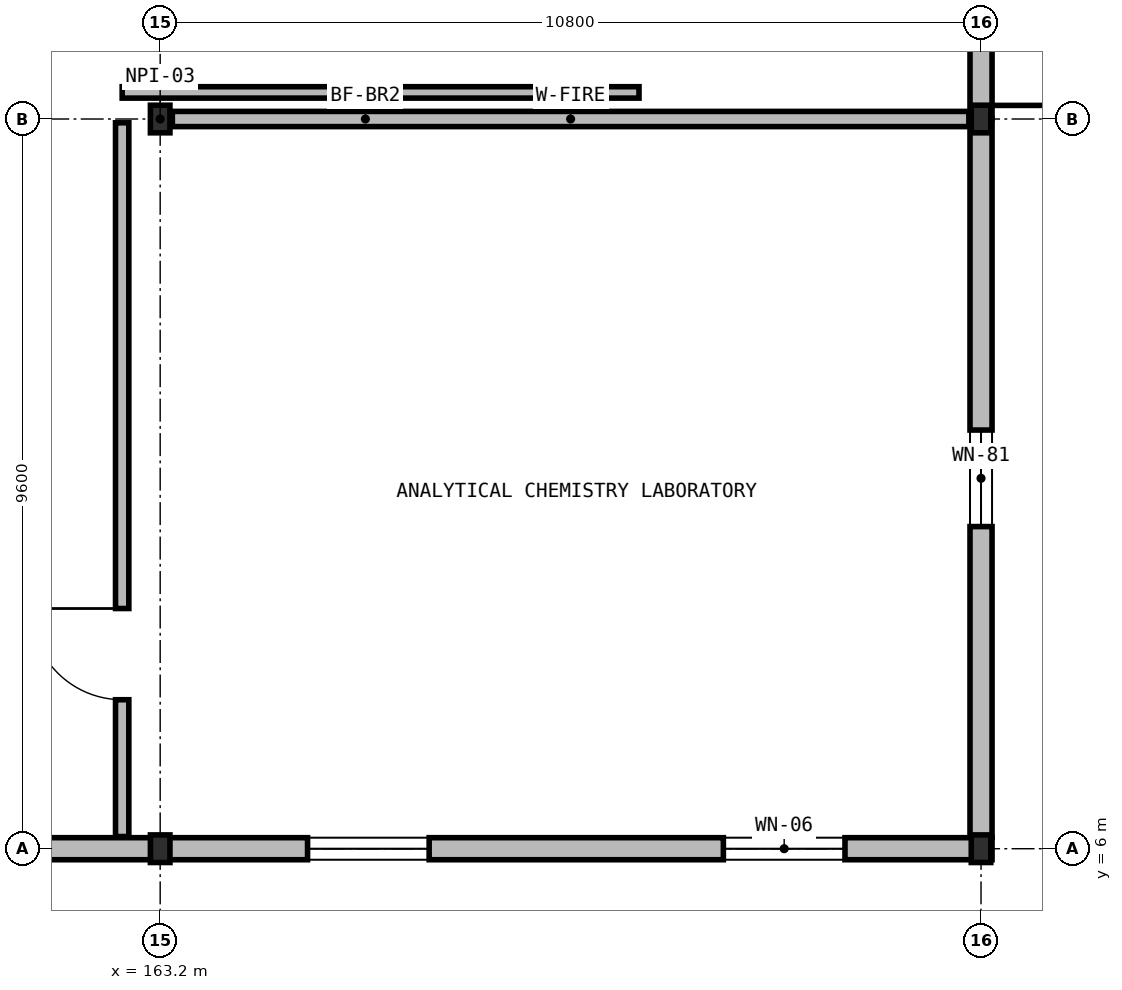
"""IFC4 building model, lengths in metres.
Left out: names, types, materials, properties, quantities, classifications, styles, units other than length and angle.
Written with IfcOpenShell. Run it as: python <this file> out.ifc"""

import sys

from ifc_helpers import new_model, si_unit, direction, frame, frame_2d, origin, origin_2d, place, context, subcontext, project, spatial, rectangle, i_section, extrude, element, fill, save


model = new_model("IFC4")
c1 = context("Model", 3, precision=1e-05, world=origin(), true_north=direction((0.0, 1.0)))
c2 = subcontext(c1, "Body", "Model", "MODEL_VIEW")
j1 = project(units=[si_unit("LENGTHUNIT", "METRE"), si_unit("PLANEANGLEUNIT", "RADIAN")], contexts=[c1])
p1 = place(None, origin())
s1 = spatial("IfcSite", under=j1, at=p1, CompositionType="ELEMENT")
p2 = place(p1, origin())
s2 = spatial("IfcBuilding", under=s1, at=p2, CompositionType="ELEMENT")
p3 = place(p2, frame((0.0, 0.0, 28.0)))
s3 = spatial("IfcBuildingStorey", under=s2, at=p3, CompositionType="ELEMENT", Elevation=28.0)
for number, where, z_axis, x_axis in (
    (1, (163.2, 6.0, 0.0), (0.0, 0.0, 1.0), (1.0, 0.0, 0.0)),
    (2, (163.2, 15.6, 0.0), (0.0, 0.0, 1.0), (1.0, 0.0, 0.0)),
    (3, (174.0, 6.0, 0.0), (0.0, 0.0, 1.0), (1.0, 0.0, 0.0)),
    (4, (174.0, 15.6, 0.0), (0.0, 0.0, 1.0), (1.0, 0.0, 0.0)),
):
    element("IfcColumn", number, at=place(p3, frame(where, z_axis=z_axis, x_axis=x_axis)), inside=s3, PredefinedType="COLUMN", context=c2, shape_type="SweptSolid", body=[
        extrude(i_section(OverallWidth=0.257, OverallDepth=0.363, WebThickness=0.013, FlangeThickness=0.022, at=origin_2d()), origin(), (0.0, 0.0, 1.0), 4.55),
    ])
p4 = place(p3, frame((174.0, 25.196, 0.0), z_axis=(0.0, 0.0, 1.0), x_axis=(0.0, -1.0, 0.0)))
e5 = element("IfcWall", 5, at=p4, inside=s3, PredefinedType="SOLIDWALL", context=c2, shape_type="SweptSolid", body=[
    extrude(rectangle(XDim=9.592, YDim=0.29, at=frame_2d((4.796, 0.0))), origin(), (0.0, 0.0, 1.0), 3.899),
])
p5 = place(p4, frame((3.446, 0.0, 0.95)))
e6 = element("IfcOpeningElement", 6, at=p5, cuts=e5, PredefinedType="OPENING", context=c2, shape_type="SweptSolid", body=[
    extrude(rectangle(XDim=2.7, YDim=1.56, at=frame_2d((1.35, 0.78))), frame((0.0, 0.155, 0.0), z_axis=(0.0, -1.0, 0.0), x_axis=(1.0, 0.0, 0.0)), (0.0, 0.0, 1.0), 0.31),
])
p6 = place(p3, frame((174.0, 15.596, 0.0), z_axis=(0.0, 0.0, 1.0), x_axis=(0.0, -1.0, 0.0)))
e7 = element("IfcWall", 7, at=p6, inside=s3, PredefinedType="SOLIDWALL", context=c2, shape_type="SweptSolid", body=[
    extrude(rectangle(XDim=9.447, YDim=0.29, at=frame_2d((4.724, 0.0))), origin(), (0.0, 0.0, 1.0), 3.899),
])
p7 = place(p6, frame((4.088, 0.0, 0.95)))
e8 = element("IfcOpeningElement", 8, at=p7, cuts=e7, PredefinedType="OPENING", context=c2, shape_type="SweptSolid", body=[
    extrude(rectangle(XDim=1.27, YDim=1.48, at=frame_2d((0.635, 0.74))), frame((0.0, 0.155, 0.0), z_axis=(0.0, -1.0, 0.0), x_axis=(1.0, 0.0, 0.0)), (0.0, 0.0, 1.0), 0.31),
])
p8 = place(p3, frame((174.145, 6.0, 0.0), z_axis=(0.0, 0.0, 1.0), x_axis=(-1.0, 0.0, 0.0)))
e9 = element("IfcWall", 9, at=p8, inside=s3, PredefinedType="SOLIDWALL", context=c2, shape_type="SweptSolid", body=[
    extrude(rectangle(XDim=10.941, YDim=0.29, at=frame_2d((5.47, 0.0))), origin(), (0.0, 0.0, 1.0), 3.829),
])
p9 = place(p8, frame((1.935, 0.0, 0.95)))
e10 = element("IfcOpeningElement", 10, at=p9, cuts=e9, PredefinedType="OPENING", context=c2, shape_type="SweptSolid", body=[
    extrude(rectangle(XDim=1.6, YDim=1.4, at=frame_2d((0.8, 0.7))), frame((0.0, 0.155, 0.0), z_axis=(0.0, -1.0, 0.0), x_axis=(1.0, 0.0, 0.0)), (0.0, 0.0, 1.0), 0.31),
])
p10 = place(p8, frame((7.406, 0.0, 0.95)))
e11 = element("IfcOpeningElement", 11, at=p10, cuts=e9, PredefinedType="OPENING", context=c2, shape_type="SweptSolid", body=[
    extrude(rectangle(XDim=1.6, YDim=1.4, at=frame_2d((0.8, 0.7))), frame((0.0, 0.155, 0.0), z_axis=(0.0, -1.0, 0.0), x_axis=(1.0, 0.0, 0.0)), (0.0, 0.0, 1.0), 0.31),
])
p11 = place(p3, frame((163.196, 6.0, 0.0), z_axis=(0.0, 0.0, 1.0), x_axis=(-1.0, 0.0, 0.0)))
e12 = element("IfcWall", 12, at=p11, inside=s3, PredefinedType="SOLIDWALL", context=c2, shape_type="SweptSolid", body=[
    extrude(rectangle(XDim=9.741, YDim=0.29, at=frame_2d((4.871, 0.0))), origin(), (0.0, 0.0, 1.0), 3.899),
])
p12 = place(p11, frame((6.176, 0.0, 0.95)))
e13 = element("IfcOpeningElement", 13, at=p12, cuts=e12, PredefinedType="OPENING", context=c2, shape_type="SweptSolid", body=[
    extrude(rectangle(XDim=2.26, YDim=1.72, at=frame_2d((1.13, 0.86))), frame((0.0, 0.155, 0.0), z_axis=(0.0, -1.0, 0.0), x_axis=(1.0, 0.0, 0.0)), (0.0, 0.0, 1.0), 0.31),
])
p13 = place(p3, frame((163.36, 15.6, 0.0), z_axis=(0.0, 0.0, 1.0), x_axis=(1.0, 0.0, 0.0)))
e14 = element("IfcWall", 14, at=p13, inside=s3, PredefinedType="SOLIDWALL", context=c2, shape_type="SweptSolid", body=[
    extrude(rectangle(XDim=10.48, YDim=0.2, at=frame_2d((5.24, 0.0))), origin(), (0.0, 0.0, 1.0), 3.753),
])
p14 = place(p3, frame((162.7, 6.16, 0.0), z_axis=(0.0, 0.0, 1.0), x_axis=(0.0, 1.0, 0.0)))
e15 = element("IfcWall", 15, at=p14, inside=s3, PredefinedType="PARTITIONING", context=c2, shape_type="SweptSolid", body=[
    extrude(rectangle(XDim=9.39, YDim=0.175, at=frame_2d((4.695, 0.0))), origin(), (0.0, 0.0, 1.0), 4.3),
])
p15 = place(p14, frame((1.8, 0.0, 0.0)))
e16 = element("IfcOpeningElement", 16, at=p15, cuts=e15, PredefinedType="OPENING", context=c2, shape_type="SweptSolid", body=[
    extrude(rectangle(XDim=1.2, YDim=2.2, at=frame_2d((0.6, 1.1))), frame((0.0, 0.097, 0.0), z_axis=(0.0, -1.0, 0.0), x_axis=(1.0, 0.0, 0.0)), (0.0, 0.0, 1.0), 0.195),
])
p16 = place(p3, frame((162.7, 15.95, 0.0), z_axis=(0.0, 0.0, 1.0), x_axis=(1.0, 0.0, 0.0)))
e17 = element("IfcWall", 17, at=p16, inside=s3, PredefinedType="PARTITIONING", context=c2, shape_type="SweptSolid", body=[
    extrude(rectangle(XDim=6.8, YDim=0.15, at=frame_2d((3.4, 0.0))), origin(), (0.0, 0.0, 1.0), 4.3),
])
p17 = place(p7, origin())
e18 = element("IfcWindow", 18, at=p17, inside=s3, PartitioningType="SINGLE_PANEL", PredefinedType="WINDOW", context=c2, shape_type="SweptSolid", body=[
    extrude(rectangle(XDim=1.27, YDim=1.48, at=frame_2d((0.635, 0.74))), frame((0.0, 0.03, 0.0), z_axis=(0.0, -1.0, 0.0), x_axis=(1.0, 0.0, 0.0)), (0.0, 0.0, 1.0), 0.06),
])
fill(e8, e18)
p18 = place(p9, origin())
e19 = element("IfcWindow", 19, at=p18, inside=s3, PartitioningType="SINGLE_PANEL", PredefinedType="WINDOW", context=c2, shape_type="SweptSolid", body=[
    extrude(rectangle(XDim=1.6, YDim=1.4, at=frame_2d((0.8, 0.7))), frame((0.0, 0.03, 0.0), z_axis=(0.0, -1.0, 0.0), x_axis=(1.0, 0.0, 0.0)), (0.0, 0.0, 1.0), 0.06),
])
fill(e10, e19)
p19 = place(p10, origin())
e20 = element("IfcWindow", 20, at=p19, inside=s3, PartitioningType="SINGLE_PANEL", PredefinedType="WINDOW", context=c2, shape_type="SweptSolid", body=[
    extrude(rectangle(XDim=1.6, YDim=1.4, at=frame_2d((0.8, 0.7))), frame((0.0, 0.03, 0.0), z_axis=(0.0, -1.0, 0.0), x_axis=(1.0, 0.0, 0.0)), (0.0, 0.0, 1.0), 0.06),
])
fill(e11, e20)
p20 = place(p15, origin())
e21 = element("IfcDoor", 21, at=p20, inside=s3, OperationType="SINGLE_SWING_RIGHT", PredefinedType="DOOR", context=c2, shape_type="SweptSolid", body=[
    extrude(rectangle(XDim=1.2, YDim=2.2, at=frame_2d((0.6, 1.1))), frame((0.0, 0.025, 0.0), z_axis=(0.0, -1.0, 0.0), x_axis=(1.0, 0.0, 0.0)), (0.0, 0.0, 1.0), 0.05),
])
fill(e16, e21)
save(model, sys.argv[1])
